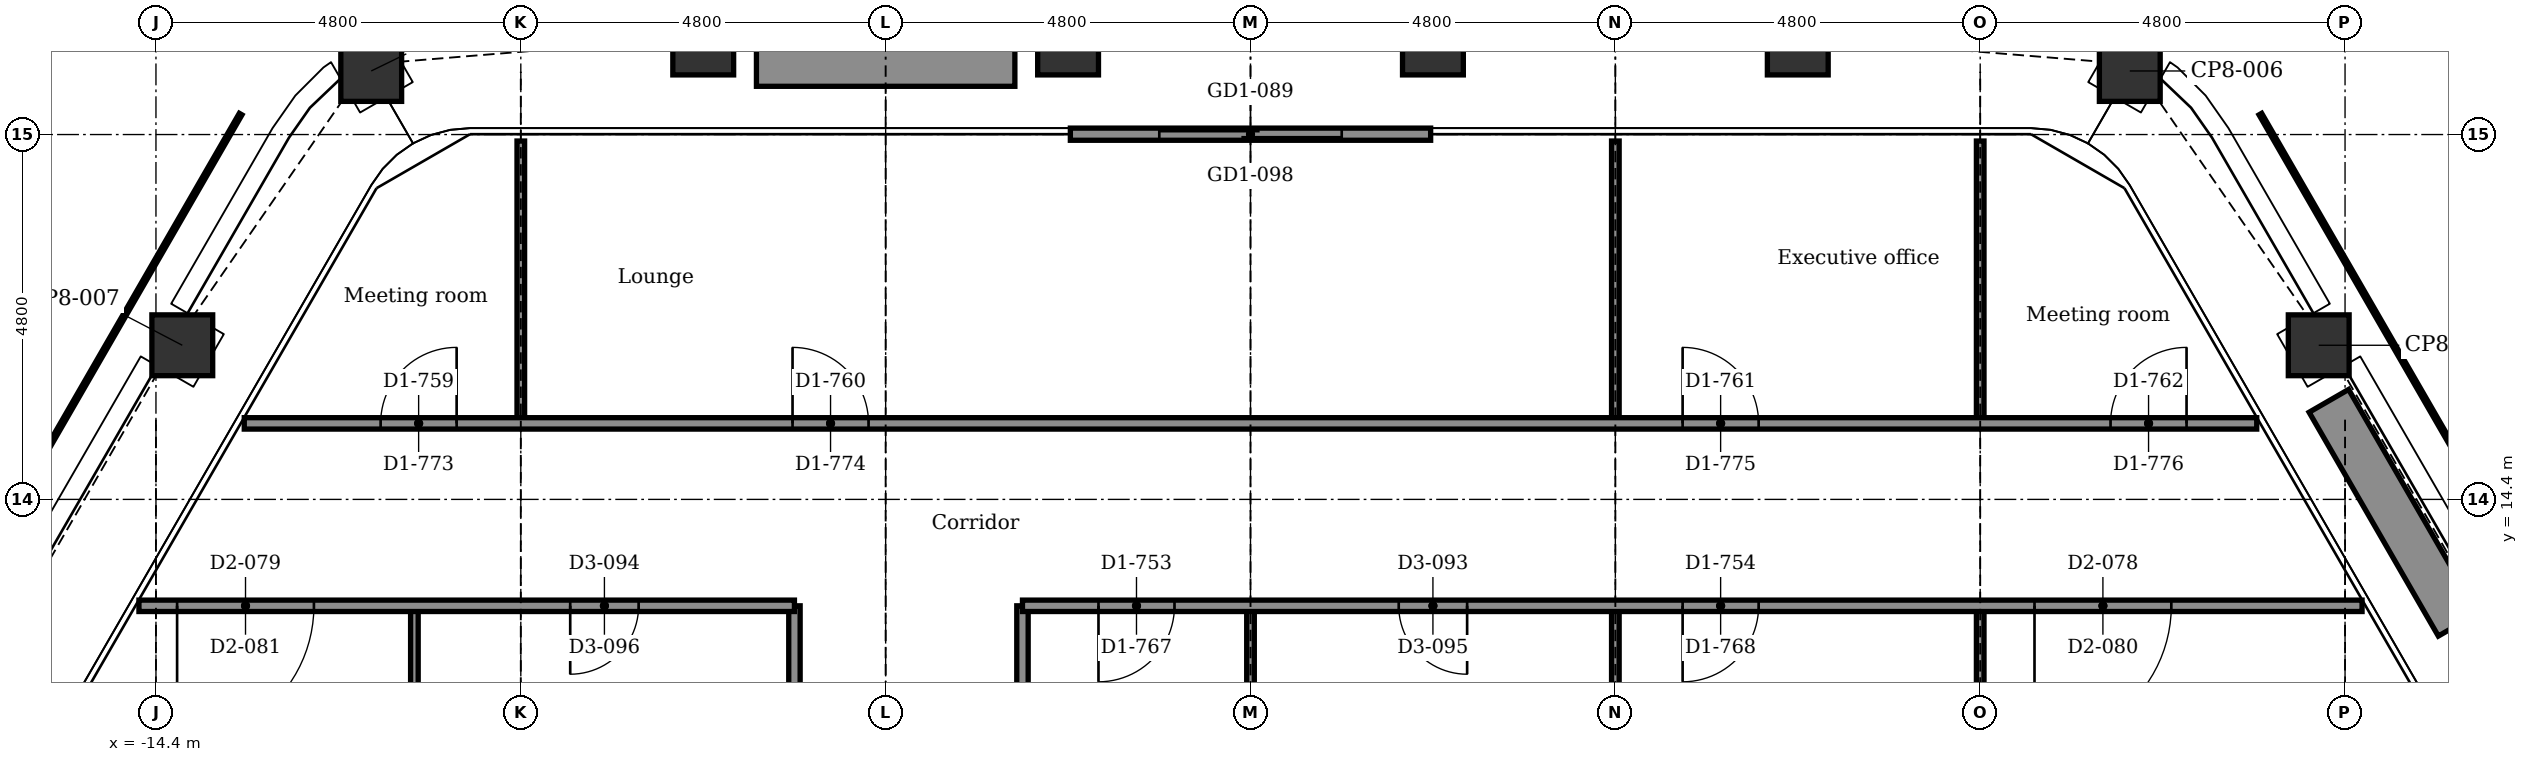
"""IFC4 building model, lengths in metres.
Left out: names, types, materials, properties, quantities, classifications, styles, units other than length and angle.
Written with IfcOpenShell. Run it as: python <this file> out.ifc"""

import sys

from ifc_helpers import new_model, si_unit, direction, frame, frame_2d, origin, origin_2d, place, context, subcontext, project, spatial, rectangle, extrude, element, fill, save


model = new_model("IFC4")
c1 = context("Model", 3, precision=1e-05, world=origin(), true_north=direction((0.0, 1.0)))
c2 = subcontext(c1, "Body", "Model", "MODEL_VIEW")
j1 = project(units=[si_unit("LENGTHUNIT", "METRE"), si_unit("PLANEANGLEUNIT", "RADIAN")], contexts=[c1])
p1 = place(None, origin())
s1 = spatial("IfcSite", under=j1, at=p1, CompositionType="ELEMENT")
p2 = place(p1, origin())
s2 = spatial("IfcBuilding", under=s1, at=p2, CompositionType="ELEMENT")
p3 = place(p2, frame((0.0, 0.0, 289.1)))
s3 = spatial("IfcBuildingStorey", under=s2, at=p3, CompositionType="ELEMENT", Elevation=289.1)
for number, where, z_axis, x_axis in (
    (1, (-11.568, 20.036, -0.15), (0.0, 0.0, 1.0), (0.866, 0.5, 0.0)),
    (2, (-7.2, 20.385, -0.15), (0.0, 0.0, 1.0), (1.0, 0.0, 0.0)),
    (3, (-2.4, 20.385, -0.15), (0.0, 0.0, 1.0), (1.0, 0.0, 0.0)),
    (4, (2.4, 20.385, -0.15), (0.0, 0.0, 1.0), (1.0, 0.0, 0.0)),
    (5, (7.2, 20.385, -0.15), (0.0, 0.0, 1.0), (1.0, 0.0, 0.0)),
    (6, (11.568, 20.036, -0.15), (0.0, 0.0, 1.0), (0.5, 0.866, 0.0)),
    (7, (14.054, 16.428, -0.15), (0.0, 0.0, 1.0), (0.866, 0.5, 0.0)),
    (8, (-14.054, 16.428, -0.15), (0.0, 0.0, 1.0), (0.5, 0.866, 0.0)),
):
    element("IfcColumn", number, at=place(p3, frame(where, z_axis=z_axis, x_axis=x_axis)), inside=s3, PredefinedType="COLUMN", context=c2, shape_type="SweptSolid", body=[
        extrude(rectangle(XDim=0.8, YDim=0.8, at=origin_2d()), origin(), (0.0, 0.0, 1.0), 3.9),
    ])
p4 = place(p3, frame((-2.37, 19.205, 0.0), z_axis=(0.0, 0.0, 1.0), x_axis=(1.0, 0.0, 0.0)))
e9 = element("IfcWall", 9, at=p4, inside=s3, PredefinedType="PARTITIONING", context=c2, shape_type="SweptSolid", body=[
    extrude(rectangle(XDim=4.74, YDim=0.16, at=frame_2d((2.37, 0.0))), origin(), (0.0, 0.0, 1.0), 3.75),
])
p5 = place(p4, frame((1.17, 0.0, 0.0)))
e10 = element("IfcOpeningElement", 10, at=p5, cuts=e9, PredefinedType="OPENING", context=c2, shape_type="SweptSolid", body=[
    extrude(rectangle(XDim=2.4, YDim=2.4, at=frame_2d((1.2, 1.2))), frame((0.0, 0.09, 0.0), z_axis=(0.0, -1.0, 0.0), x_axis=(1.0, 0.0, 0.0)), (0.0, 0.0, 1.0), 0.18),
])
p6 = place(p3, frame((-6.5, 20.135, 0.0), z_axis=(0.0, 0.0, 1.0), x_axis=(1.0, 0.0, 0.0)))
e11 = element("IfcWall", 11, at=p6, inside=s3, PredefinedType="USERDEFINED", context=c2, shape_type="SweptSolid", body=[
    extrude(rectangle(XDim=3.4, YDim=0.6, at=frame_2d((1.7, 0.0))), origin(), (0.0, 0.0, 1.0), 0.7),
])
p7 = place(p3, frame((14.187, 15.697, 0.0), z_axis=(0.0, 0.0, 1.0), x_axis=(0.499977295307, -0.866038511948, 0.0)))
e12 = element("IfcWall", 12, at=p7, inside=s3, PredefinedType="USERDEFINED", context=c2, shape_type="SweptSolid", body=[
    extrude(rectangle(XDim=3.4, YDim=0.6, at=frame_2d((1.7, 0.0))), origin(), (0.0, 0.0, 1.0), 0.7),
])
p8 = place(p3, frame((9.6, 9.925, 0.0), z_axis=(0.0, 0.0, 1.0), x_axis=(0.0, 1.0, 0.0)))
e13 = element("IfcWall", 13, at=p8, inside=s3, PredefinedType="PARTITIONING", context=c2, shape_type="SweptSolid", body=[
    extrude(rectangle(XDim=3.075, YDim=0.1, at=frame_2d((1.538, 0.0))), origin(), (0.0, 0.0, 1.0), 3.217),
])
p9 = place(p3, frame((9.6, 15.4, 0.0), z_axis=(0.0, 0.0, 1.0), x_axis=(0.0, 1.0, 0.0)))
e14 = element("IfcWall", 14, at=p9, inside=s3, PredefinedType="PARTITIONING", context=c2, shape_type="SweptSolid", body=[
    extrude(rectangle(XDim=3.715, YDim=0.1, at=frame_2d((1.857, 0.0))), origin(), (0.0, 0.0, 1.0), 3.217),
])
p10 = place(p3, frame((4.8, 9.875, 0.0), z_axis=(0.0, 0.0, 1.0), x_axis=(0.0, 1.0, 0.0)))
e15 = element("IfcWall", 15, at=p10, inside=s3, PredefinedType="PARTITIONING", context=c2, shape_type="SweptSolid", body=[
    extrude(rectangle(XDim=3.125, YDim=0.1, at=frame_2d((1.562, 0.0))), origin(), (0.0, 0.0, 1.0), 3.217),
])
p11 = place(p3, frame((4.8, 15.4, 0.0), z_axis=(0.0, 0.0, 1.0), x_axis=(0.0, 1.0, 0.0)))
e16 = element("IfcWall", 16, at=p11, inside=s3, PredefinedType="PARTITIONING", context=c2, shape_type="SweptSolid", body=[
    extrude(rectangle(XDim=3.715, YDim=0.1, at=frame_2d((1.857, 0.0))), origin(), (0.0, 0.0, 1.0), 3.217),
])
p12 = place(p3, frame((0.0, 9.875, 0.0), z_axis=(0.0, 0.0, 1.0), x_axis=(0.0, 1.0, 0.0)))
e17 = element("IfcWall", 17, at=p12, inside=s3, PredefinedType="PARTITIONING", context=c2, shape_type="SweptSolid", body=[
    extrude(rectangle(XDim=3.125, YDim=0.1, at=frame_2d((1.562, 0.0))), origin(), (0.0, 0.0, 1.0), 3.217),
])
p13 = place(p3, frame((-3.0, 9.875, 0.0), z_axis=(0.0, 0.0, 1.0), x_axis=(0.0, 1.0, 0.0)))
e18 = element("IfcWall", 18, at=p13, inside=s3, PredefinedType="PARTITIONING", context=c2, shape_type="SweptSolid", body=[
    extrude(rectangle(XDim=3.125, YDim=0.15, at=frame_2d((1.562, 0.0))), origin(), (0.0, 0.0, 1.0), 3.75),
])
p14 = place(p3, frame((-6.0, 10.15, 0.0), z_axis=(0.0, 0.0, 1.0), x_axis=(0.0, 1.0, 0.0)))
e19 = element("IfcWall", 19, at=p14, inside=s3, PredefinedType="PARTITIONING", context=c2, shape_type="SweptSolid", body=[
    extrude(rectangle(XDim=2.85, YDim=0.15, at=frame_2d((1.425, 0.0))), origin(), (0.0, 0.0, 1.0), 3.75),
])
p15 = place(p3, frame((-9.6, 15.4, 0.0), z_axis=(0.0, 0.0, 1.0), x_axis=(0.0, 1.0, 0.0)))
e20 = element("IfcWall", 20, at=p15, inside=s3, PredefinedType="PARTITIONING", context=c2, shape_type="SweptSolid", body=[
    extrude(rectangle(XDim=3.715, YDim=0.1, at=frame_2d((1.857, 0.0))), origin(), (0.0, 0.0, 1.0), 3.293),
])
p16 = place(p3, frame((-11.0, 10.0, 0.0), z_axis=(0.0, 0.0, 1.0), x_axis=(0.0, 1.0, 0.0)))
e21 = element("IfcWall", 21, at=p16, inside=s3, PredefinedType="PARTITIONING", context=c2, shape_type="SweptSolid", body=[
    extrude(rectangle(XDim=3.0, YDim=0.1, at=frame_2d((1.5, 0.0))), origin(), (0.0, 0.0, 1.0), 3.75),
])
p17 = place(p3, frame((-14.624, 13.0, 0.0), z_axis=(0.0, 0.0, 1.0), x_axis=(1.0, 0.0, 0.0)))
e22 = element("IfcWall", 22, at=p17, inside=s3, PredefinedType="PARTITIONING", context=c2, shape_type="SweptSolid", body=[
    extrude(rectangle(XDim=8.624, YDim=0.15, at=frame_2d((4.312, 0.0))), origin(), (0.0, 0.0, 1.0), 3.75),
])
p18 = place(p17, frame((5.674, 0.0, 0.0)))
e23 = element("IfcOpeningElement", 23, at=p18, cuts=e22, PredefinedType="OPENING", context=c2, shape_type="SweptSolid", body=[
    extrude(rectangle(XDim=0.9, YDim=2.1, at=frame_2d((0.45, 1.05))), frame((0.0, 0.085, 0.0), z_axis=(0.0, -1.0, 0.0), x_axis=(1.0, 0.0, 0.0)), (0.0, 0.0, 1.0), 0.17),
])
p19 = place(p17, frame((0.502, 0.0, 0.0)))
e24 = element("IfcOpeningElement", 24, at=p19, cuts=e22, PredefinedType="OPENING", context=c2, shape_type="SweptSolid", body=[
    extrude(rectangle(XDim=1.8, YDim=2.1, at=frame_2d((0.9, 1.05))), frame((0.0, 0.085, 0.0), z_axis=(0.0, -1.0, 0.0), x_axis=(1.0, 0.0, 0.0)), (0.0, 0.0, 1.0), 0.17),
])
p20 = place(p3, frame((-3.0, 13.0, 0.0), z_axis=(0.0, 0.0, 1.0), x_axis=(1.0, 0.0, 0.0)))
e25 = element("IfcWall", 25, at=p20, inside=s3, PredefinedType="PARTITIONING", context=c2, shape_type="SweptSolid", body=[
    extrude(rectangle(XDim=17.624, YDim=0.15, at=frame_2d((8.812, 0.0))), origin(), (0.0, 0.0, 1.0), 3.75),
])
p21 = place(p20, frame((1.0, 0.0, 0.0)))
e26 = element("IfcOpeningElement", 26, at=p21, cuts=e25, PredefinedType="OPENING", context=c2, shape_type="SweptSolid", body=[
    extrude(rectangle(XDim=1.0, YDim=2.1, at=frame_2d((0.5, 1.05))), frame((0.0, 0.085, 0.0), z_axis=(0.0, -1.0, 0.0), x_axis=(1.0, 0.0, 0.0)), (0.0, 0.0, 1.0), 0.17),
])
p22 = place(p20, frame((4.95, 0.0, 0.0)))
e27 = element("IfcOpeningElement", 27, at=p22, cuts=e25, PredefinedType="OPENING", context=c2, shape_type="SweptSolid", body=[
    extrude(rectangle(XDim=0.9, YDim=2.1, at=frame_2d((0.45, 1.05))), frame((0.0, 0.085, 0.0), z_axis=(0.0, -1.0, 0.0), x_axis=(1.0, 0.0, 0.0)), (0.0, 0.0, 1.0), 0.17),
])
p23 = place(p20, frame((8.685, 0.0, 0.0)))
e28 = element("IfcOpeningElement", 28, at=p23, cuts=e25, PredefinedType="OPENING", context=c2, shape_type="SweptSolid", body=[
    extrude(rectangle(XDim=1.0, YDim=2.1, at=frame_2d((0.5, 1.05))), frame((0.0, 0.085, 0.0), z_axis=(0.0, -1.0, 0.0), x_axis=(1.0, 0.0, 0.0)), (0.0, 0.0, 1.0), 0.17),
])
p24 = place(p20, frame((13.314, 0.0, 0.0)))
e29 = element("IfcOpeningElement", 29, at=p24, cuts=e25, PredefinedType="OPENING", context=c2, shape_type="SweptSolid", body=[
    extrude(rectangle(XDim=1.8, YDim=2.1, at=frame_2d((0.9, 1.05))), frame((0.0, 0.085, 0.0), z_axis=(0.0, -1.0, 0.0), x_axis=(1.0, 0.0, 0.0)), (0.0, 0.0, 1.0), 0.17),
])
p25 = place(p3, frame((-13.238, 15.4, 0.0), z_axis=(0.0, 0.0, 1.0), x_axis=(1.0, 0.0, 0.0)))
e30 = element("IfcWall", 30, at=p25, inside=s3, PredefinedType="PARTITIONING", context=c2, shape_type="SweptSolid", body=[
    extrude(rectangle(XDim=26.477, YDim=0.15, at=frame_2d((13.238, 0.0))), origin(), (0.0, 0.0, 1.0), 3.75),
])
p26 = place(p25, frame((1.794, 0.0, 0.0)))
e31 = element("IfcOpeningElement", 31, at=p26, cuts=e30, PredefinedType="OPENING", context=c2, shape_type="SweptSolid", body=[
    extrude(rectangle(XDim=1.0, YDim=2.1, at=frame_2d((0.5, 1.05))), frame((0.0, 0.085, 0.0), z_axis=(0.0, -1.0, 0.0), x_axis=(1.0, 0.0, 0.0)), (0.0, 0.0, 1.0), 0.17),
])
p27 = place(p25, frame((7.213, 0.0, 0.0)))
e32 = element("IfcOpeningElement", 32, at=p27, cuts=e30, PredefinedType="OPENING", context=c2, shape_type="SweptSolid", body=[
    extrude(rectangle(XDim=1.0, YDim=2.1, at=frame_2d((0.5, 1.05))), frame((0.0, 0.085, 0.0), z_axis=(0.0, -1.0, 0.0), x_axis=(1.0, 0.0, 0.0)), (0.0, 0.0, 1.0), 0.17),
])
p28 = place(p25, frame((18.923, 0.0, 0.0)))
e33 = element("IfcOpeningElement", 33, at=p28, cuts=e30, PredefinedType="OPENING", context=c2, shape_type="SweptSolid", body=[
    extrude(rectangle(XDim=1.0, YDim=2.1, at=frame_2d((0.5, 1.05))), frame((0.0, 0.085, 0.0), z_axis=(0.0, -1.0, 0.0), x_axis=(1.0, 0.0, 0.0)), (0.0, 0.0, 1.0), 0.17),
])
p29 = place(p25, frame((24.553, 0.0, 0.0)))
e34 = element("IfcOpeningElement", 34, at=p29, cuts=e30, PredefinedType="OPENING", context=c2, shape_type="SweptSolid", body=[
    extrude(rectangle(XDim=1.0, YDim=2.1, at=frame_2d((0.5, 1.05))), frame((0.0, 0.085, 0.0), z_axis=(0.0, -1.0, 0.0), x_axis=(1.0, 0.0, 0.0)), (0.0, 0.0, 1.0), 0.17),
])
p30 = place(p5, origin())
e35 = element("IfcDoor", 35, at=p30, inside=s3, OperationType="DOUBLE_DOOR_SLIDING", PredefinedType="DOOR", context=c2, shape_type="SweptSolid", body=[
    extrude(rectangle(XDim=2.4, YDim=2.4, at=frame_2d((1.2, 1.2))), frame((0.0, 0.025, 0.0), z_axis=(0.0, -1.0, 0.0), x_axis=(1.0, 0.0, 0.0)), (0.0, 0.0, 1.0), 0.05),
])
fill(e10, e35)
p31 = place(p21, frame((1.0, 0.0, 0.0), z_axis=(0.0, 0.0, 1.0), x_axis=(-1.0, 0.0, 0.0)))
e36 = element("IfcDoor", 36, at=p31, inside=s3, OperationType="SINGLE_SWING_LEFT", PredefinedType="DOOR", context=c2, shape_type="SweptSolid", body=[
    extrude(rectangle(XDim=1.0, YDim=2.1, at=frame_2d((0.5, 1.05))), frame((0.0, 0.025, 0.0), z_axis=(0.0, -1.0, 0.0), x_axis=(1.0, 0.0, 0.0)), (0.0, 0.0, 1.0), 0.05),
])
fill(e26, e36)
p32 = place(p22, frame((0.9, 0.0, 0.0), z_axis=(0.0, 0.0, 1.0), x_axis=(-1.0, 0.0, 0.0)))
e37 = element("IfcDoor", 37, at=p32, inside=s3, OperationType="SINGLE_SWING_RIGHT", PredefinedType="DOOR", context=c2, shape_type="SweptSolid", body=[
    extrude(rectangle(XDim=0.9, YDim=2.1, at=frame_2d((0.45, 1.05))), frame((0.0, 0.025, 0.0), z_axis=(0.0, -1.0, 0.0), x_axis=(1.0, 0.0, 0.0)), (0.0, 0.0, 1.0), 0.05),
])
fill(e27, e37)
p33 = place(p23, frame((1.0, 0.0, 0.0), z_axis=(0.0, 0.0, 1.0), x_axis=(-1.0, 0.0, 0.0)))
e38 = element("IfcDoor", 38, at=p33, inside=s3, OperationType="SINGLE_SWING_LEFT", PredefinedType="DOOR", context=c2, shape_type="SweptSolid", body=[
    extrude(rectangle(XDim=1.0, YDim=2.1, at=frame_2d((0.5, 1.05))), frame((0.0, 0.025, 0.0), z_axis=(0.0, -1.0, 0.0), x_axis=(1.0, 0.0, 0.0)), (0.0, 0.0, 1.0), 0.05),
])
fill(e28, e38)
p34 = place(p18, frame((0.9, 0.0, 0.0), z_axis=(0.0, 0.0, 1.0), x_axis=(-1.0, 0.0, 0.0)))
e39 = element("IfcDoor", 39, at=p34, inside=s3, OperationType="SINGLE_SWING_LEFT", PredefinedType="DOOR", context=c2, shape_type="SweptSolid", body=[
    extrude(rectangle(XDim=0.9, YDim=2.1, at=frame_2d((0.45, 1.05))), frame((0.0, 0.025, 0.0), z_axis=(0.0, -1.0, 0.0), x_axis=(1.0, 0.0, 0.0)), (0.0, 0.0, 1.0), 0.05),
])
fill(e23, e39)
p35 = place(p26, origin())
e40 = element("IfcDoor", 40, at=p35, inside=s3, OperationType="SINGLE_SWING_RIGHT", PredefinedType="DOOR", context=c2, shape_type="SweptSolid", body=[
    extrude(rectangle(XDim=1.0, YDim=2.1, at=frame_2d((0.5, 1.05))), frame((0.0, 0.025, 0.0), z_axis=(0.0, -1.0, 0.0), x_axis=(1.0, 0.0, 0.0)), (0.0, 0.0, 1.0), 0.05),
])
fill(e31, e40)
p36 = place(p27, origin())
e41 = element("IfcDoor", 41, at=p36, inside=s3, OperationType="SINGLE_SWING_LEFT", PredefinedType="DOOR", context=c2, shape_type="SweptSolid", body=[
    extrude(rectangle(XDim=1.0, YDim=2.1, at=frame_2d((0.5, 1.05))), frame((0.0, 0.025, 0.0), z_axis=(0.0, -1.0, 0.0), x_axis=(1.0, 0.0, 0.0)), (0.0, 0.0, 1.0), 0.05),
])
fill(e32, e41)
p37 = place(p28, origin())
e42 = element("IfcDoor", 42, at=p37, inside=s3, OperationType="SINGLE_SWING_LEFT", PredefinedType="DOOR", context=c2, shape_type="SweptSolid", body=[
    extrude(rectangle(XDim=1.0, YDim=2.1, at=frame_2d((0.5, 1.05))), frame((0.0, 0.025, 0.0), z_axis=(0.0, -1.0, 0.0), x_axis=(1.0, 0.0, 0.0)), (0.0, 0.0, 1.0), 0.05),
])
fill(e33, e42)
p38 = place(p29, origin())
e43 = element("IfcDoor", 43, at=p38, inside=s3, OperationType="SINGLE_SWING_RIGHT", PredefinedType="DOOR", context=c2, shape_type="SweptSolid", body=[
    extrude(rectangle(XDim=1.0, YDim=2.1, at=frame_2d((0.5, 1.05))), frame((0.0, 0.025, 0.0), z_axis=(0.0, -1.0, 0.0), x_axis=(1.0, 0.0, 0.0)), (0.0, 0.0, 1.0), 0.05),
])
fill(e34, e43)
p39 = place(p24, frame((1.8, 0.0, 0.0), z_axis=(0.0, 0.0, 1.0), x_axis=(-1.0, 0.0, 0.0)))
e44 = element("IfcDoor", 44, at=p39, inside=s3, OperationType="SINGLE_SWING_LEFT", PredefinedType="DOOR", context=c2, shape_type="SweptSolid", body=[
    extrude(rectangle(XDim=1.8, YDim=2.1, at=frame_2d((0.9, 1.05))), frame((0.0, 0.025, 0.0), z_axis=(0.0, -1.0, 0.0), x_axis=(1.0, 0.0, 0.0)), (0.0, 0.0, 1.0), 0.05),
])
fill(e29, e44)
p40 = place(p19, frame((1.8, 0.0, 0.0), z_axis=(0.0, 0.0, 1.0), x_axis=(-1.0, 0.0, 0.0)))
e45 = element("IfcDoor", 45, at=p40, inside=s3, OperationType="SINGLE_SWING_LEFT", PredefinedType="DOOR", context=c2, shape_type="SweptSolid", body=[
    extrude(rectangle(XDim=1.8, YDim=2.1, at=frame_2d((0.9, 1.05))), frame((0.0, 0.025, 0.0), z_axis=(0.0, -1.0, 0.0), x_axis=(1.0, 0.0, 0.0)), (0.0, 0.0, 1.0), 0.05),
])
fill(e24, e45)
save(model, sys.argv[1])
